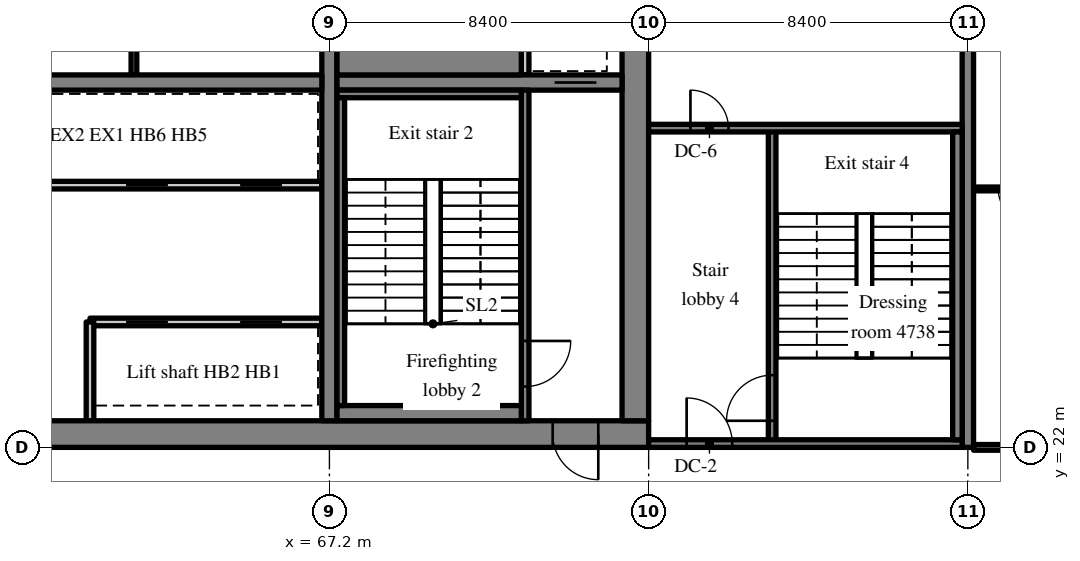
"""IFC4 building model, lengths in metres.
Left out: names, types, materials, properties, quantities, classifications, styles, units other than length and angle.
Written with IfcOpenShell. Run it as: python <this file> out.ifc"""

import sys

from ifc_helpers import new_model, si_unit, direction, frame, frame_2d, origin, place, context, subcontext, project, spatial, rectangle, extrude, source, transform, mapped, element, fill, save


model = new_model("IFC4")
c1 = context("Model", 3, precision=1e-05, world=origin(), true_north=direction((0.0, 1.0)))
c2 = subcontext(c1, "Body", "Model", "MODEL_VIEW")
j1 = project(units=[si_unit("LENGTHUNIT", "METRE"), si_unit("PLANEANGLEUNIT", "RADIAN")], contexts=[c1])
p1 = place(None, origin())
s1 = spatial("IfcSite", under=j1, at=p1, CompositionType="ELEMENT")
p2 = place(p1, origin())
s2 = spatial("IfcBuilding", under=s1, at=p2, CompositionType="ELEMENT")
p3 = place(p2, frame((0.0, 0.0, 193.4)))
s3 = spatial("IfcBuildingStorey", under=s2, at=p3, CompositionType="ELEMENT", Elevation=193.4)
m1 = source(origin(), c2, "Body", "SweptSolid", [
    extrude(rectangle(XDim=50.4, YDim=0.7, at=frame_2d((25.2, 0.0))), origin(), (0.0, 0.0, 1.0), 3.52),
])
p4 = place(p3, frame((25.2, 22.35, 0.0), z_axis=(0.0, 0.0, 1.0), x_axis=(1.0, 0.0, 0.0)))
e1 = element("IfcWall", 1, at=p4, inside=s3, PredefinedType="SHEAR", context=c2, shape_type="MappedRepresentation", body=[
    mapped(m1, transform((0.0, 0.0, 0.0), scale=1.0)),
])
m2 = source(origin(), c2, "Body", "SweptSolid", [
    extrude(rectangle(XDim=1.8, YDim=2.1, at=frame_2d((0.9, 1.05))), frame((0.0, 0.36, 0.0), z_axis=(0.0, -1.0, 0.0), x_axis=(1.0, 0.0, 0.0)), (0.0, 0.0, 1.0), 0.72),
])
p5 = place(p4, frame((15.9, 0.0, 0.0)))
e2 = element("IfcOpeningElement", 2, at=p5, cuts=e1, PredefinedType="OPENING", context=c2, shape_type="MappedRepresentation", body=[
    mapped(m2, transform((0.0, 0.0, 0.0), scale=1.0)),
])
m3 = source(origin(), c2, "Body", "SweptSolid", [
    extrude(rectangle(XDim=0.9, YDim=2.1, at=frame_2d((0.45, 1.05))), frame((0.0, 0.36, 0.0), z_axis=(0.0, -1.0, 0.0), x_axis=(1.0, 0.0, 0.0)), (0.0, 0.0, 1.0), 0.72),
])
p6 = place(p4, frame((9.7, 0.0, 0.0)))
e3 = element("IfcOpeningElement", 3, at=p6, cuts=e1, PredefinedType="OPENING", context=c2, shape_type="MappedRepresentation", body=[
    mapped(m3, transform((0.0, 0.0, 0.0), scale=1.0)),
])
p7 = place(p4, frame((21.5, 0.0, 0.0)))
e4 = element("IfcOpeningElement", 4, at=p7, cuts=e1, PredefinedType="OPENING", context=c2, shape_type="MappedRepresentation", body=[
    mapped(m3, transform((0.0, 0.0, 0.0), scale=1.0)),
])
p8 = place(p4, frame((32.7, 0.0, 0.0)))
e5 = element("IfcOpeningElement", 5, at=p8, cuts=e1, PredefinedType="OPENING", context=c2, shape_type="MappedRepresentation", body=[
    mapped(m2, transform((0.0, 0.0, 0.0), scale=1.0)),
])
m4 = source(origin(), c2, "Body", "SweptSolid", [
    extrude(rectangle(XDim=1.2, YDim=2.1, at=frame_2d((0.6, 1.05))), frame((0.0, 0.36, 0.0), z_axis=(0.0, -1.0, 0.0), x_axis=(1.0, 0.0, 0.0)), (0.0, 0.0, 1.0), 0.72),
])
p9 = place(p4, frame((6.475, 0.0, 0.0)))
e6 = element("IfcOpeningElement", 6, at=p9, cuts=e1, PredefinedType="OPENING", context=c2, shape_type="MappedRepresentation", body=[
    mapped(m4, transform((0.0, 0.0, 0.0), scale=1.0)),
])
p10 = place(p4, frame((47.875, 0.0, 0.0)))
e7 = element("IfcOpeningElement", 7, at=p10, cuts=e1, PredefinedType="OPENING", context=c2, shape_type="MappedRepresentation", body=[
    mapped(m4, transform((0.0, 0.0, 0.0), scale=1.0)),
])
m5 = source(origin(), c2, "Body", "SweptSolid", [
    extrude(rectangle(XDim=18.6, YDim=0.7, at=frame_2d((9.3, 0.0))), origin(), (0.0, 0.0, 1.0), 3.52),
])
p11 = place(p3, frame((75.25, 22.7, 0.0), z_axis=(0.0, 0.0, 1.0), x_axis=(0.0, 1.0, 0.0)))
e8 = element("IfcWall", 8, at=p11, inside=s3, PredefinedType="SHEAR", context=c2, shape_type="MappedRepresentation", body=[
    mapped(m5, transform((0.0, 0.0, 0.0), scale=1.0)),
])
p12 = place(p11, frame((12.7, 0.0, 0.0)))
e9 = element("IfcOpeningElement", 9, at=p12, cuts=e8, PredefinedType="OPENING", context=c2, shape_type="MappedRepresentation", body=[
    mapped(m4, transform((0.0, 0.0, 0.0), scale=1.0)),
])
m6 = source(origin(), c2, "Body", "SweptSolid", [
    extrude(rectangle(XDim=18.6, YDim=0.4, at=frame_2d((9.3, 0.0))), origin(), (0.0, 0.0, 1.0), 3.52),
])
p13 = place(p3, frame((67.2, 22.7, 0.0), z_axis=(0.0, 0.0, 1.0), x_axis=(0.0, 1.0, 0.0)))
e10 = element("IfcWall", 10, at=p13, inside=s3, PredefinedType="SHEAR", context=c2, shape_type="MappedRepresentation", body=[
    mapped(m6, transform((0.0, 0.0, 0.0), scale=1.0)),
])
m7 = source(origin(), c2, "Body", "SweptSolid", [
    extrude(rectangle(XDim=16.4, YDim=0.4, at=frame_2d((8.2, 0.0))), origin(), (0.0, 0.0, 1.0), 3.52),
])
p14 = place(p3, frame((50.6, 31.6, 0.0), z_axis=(0.0, 0.0, 1.0), x_axis=(1.0, 0.0, 0.0)))
e11 = element("IfcWall", 11, at=p14, inside=s3, PredefinedType="SHEAR", context=c2, shape_type="MappedRepresentation", body=[
    mapped(m7, transform((0.0, 0.0, 0.0), scale=1.0)),
])
m8 = source(origin(), c2, "Body", "SweptSolid", [
    extrude(rectangle(XDim=1.0, YDim=2.1, at=frame_2d((0.5, 1.05))), frame((0.0, 0.21, 0.0), z_axis=(0.0, -1.0, 0.0), x_axis=(1.0, 0.0, 0.0)), (0.0, 0.0, 1.0), 0.42),
])
p15 = place(p14, frame((0.6, 0.0, 0.0)))
e12 = element("IfcOpeningElement", 12, at=p15, cuts=e11, PredefinedType="OPENING", context=c2, shape_type="MappedRepresentation", body=[
    mapped(m8, transform((0.0, 0.0, 0.0), scale=1.0)),
])
m9 = source(origin(), c2, "Body", "SweptSolid", [
    extrude(rectangle(XDim=7.5, YDim=0.4, at=frame_2d((3.75, 0.0))), origin(), (0.0, 0.0, 1.0), 3.52),
])
p16 = place(p3, frame((67.4, 31.6, 0.0), z_axis=(0.0, 0.0, 1.0), x_axis=(1.0, 0.0, 0.0)))
e13 = element("IfcWall", 13, at=p16, inside=s3, PredefinedType="SHEAR", context=c2, shape_type="MappedRepresentation", body=[
    mapped(m9, transform((0.0, 0.0, 0.0), scale=1.0)),
])
m10 = source(origin(), c2, "Body", "SweptSolid", [
    extrude(rectangle(XDim=1.1, YDim=2.1, at=frame_2d((0.55, 1.05))), frame((0.0, 0.21, 0.0), z_axis=(0.0, -1.0, 0.0), x_axis=(1.0, 0.0, 0.0)), (0.0, 0.0, 1.0), 0.42),
])
p17 = place(p16, frame((5.725, 0.0, 0.0)))
e14 = element("IfcOpeningElement", 14, at=p17, cuts=e13, PredefinedType="OPENING", context=c2, shape_type="MappedRepresentation", body=[
    mapped(m10, transform((0.0, 0.0, 0.0), scale=1.0)),
])
m11 = source(origin(), c2, "Body", "SweptSolid", [
    extrude(rectangle(XDim=20.0, YDim=0.3, at=frame_2d((10.0, 0.0))), origin(), (0.0, 0.0, 1.0), 3.52),
])
p18 = place(p3, frame((84.0, 22.0, 0.0), z_axis=(0.0, 0.0, 1.0), x_axis=(0.0, 1.0, 0.0)))
e15 = element("IfcWall", 15, at=p18, inside=s3, PredefinedType="SHEAR", context=c2, shape_type="MappedRepresentation", body=[
    mapped(m11, transform((0.0, 0.0, 0.0), scale=1.0)),
])
m12 = source(origin(), c2, "Body", "SweptSolid", [
    extrude(rectangle(XDim=6.1, YDim=0.2, at=frame_2d((3.05, 0.0))), origin(), (0.0, 0.0, 1.0), 3.52),
])
p19 = place(p3, frame((67.0, 25.3, 0.0), z_axis=(0.0, 0.0, 1.0), x_axis=(-1.0, 0.0, 0.0)))
e16 = element("IfcWall", 16, at=p19, inside=s3, PredefinedType="SOLIDWALL", context=c2, shape_type="MappedRepresentation", body=[
    mapped(m12, transform((0.0, 0.0, 0.0), scale=1.0)),
])
m13 = source(origin(), c2, "Body", "SweptSolid", [
    extrude(rectangle(XDim=1.1, YDim=2.1, at=frame_2d((0.55, 1.05))), frame((0.0, 0.11, 0.0), z_axis=(0.0, -1.0, 0.0), x_axis=(1.0, 0.0, 0.0)), (0.0, 0.0, 1.0), 0.22),
])
p20 = place(p19, frame((1.05, 0.0, 0.0)))
e17 = element("IfcOpeningElement", 17, at=p20, cuts=e16, PredefinedType="OPENING", context=c2, shape_type="MappedRepresentation", body=[
    mapped(m13, transform((0.0, 0.0, 0.0), scale=1.0)),
])
p21 = place(p19, frame((4.05, 0.0, 0.0)))
e18 = element("IfcOpeningElement", 18, at=p21, cuts=e16, PredefinedType="OPENING", context=c2, shape_type="MappedRepresentation", body=[
    mapped(m13, transform((0.0, 0.0, 0.0), scale=1.0)),
])
m14 = source(origin(), c2, "Body", "SweptSolid", [
    extrude(rectangle(XDim=12.1, YDim=0.2, at=frame_2d((6.05, 0.0))), origin(), (0.0, 0.0, 1.0), 3.52),
])
p22 = place(p3, frame((67.0, 28.9, 0.0), z_axis=(0.0, 0.0, 1.0), x_axis=(-1.0, 0.0, 0.0)))
e19 = element("IfcWall", 19, at=p22, inside=s3, PredefinedType="SOLIDWALL", context=c2, shape_type="MappedRepresentation", body=[
    mapped(m14, transform((0.0, 0.0, 0.0), scale=1.0)),
])
p23 = place(p22, frame((1.05, 0.0, 0.0)))
e20 = element("IfcOpeningElement", 20, at=p23, cuts=e19, PredefinedType="OPENING", context=c2, shape_type="MappedRepresentation", body=[
    mapped(m13, transform((0.0, 0.0, 0.0), scale=1.0)),
])
p24 = place(p22, frame((4.05, 0.0, 0.0)))
e21 = element("IfcOpeningElement", 21, at=p24, cuts=e19, PredefinedType="OPENING", context=c2, shape_type="MappedRepresentation", body=[
    mapped(m13, transform((0.0, 0.0, 0.0), scale=1.0)),
])
m15 = source(origin(), c2, "Body", "SweptSolid", [
    extrude(rectangle(XDim=2.6, YDim=0.2, at=frame_2d((1.3, 0.0))), origin(), (0.0, 0.0, 1.0), 3.52),
])
p25 = place(p3, frame((60.9, 22.7, 0.0), z_axis=(0.0, 0.0, 1.0), x_axis=(0.0, 1.0, 0.0)))
e22 = element("IfcWall", 22, at=p25, inside=s3, PredefinedType="SOLIDWALL", context=c2, shape_type="MappedRepresentation", body=[
    mapped(m15, transform((0.0, 0.0, 0.0), scale=1.0)),
])
m16 = source(origin(), c2, "Body", "SweptSolid", [
    extrude(rectangle(XDim=3.2, YDim=0.15, at=frame_2d((1.6, 0.0))), origin(), (0.0, 0.0, 1.0), 3.52),
])
p26 = place(p3, frame((62.056, 31.8, 0.0), z_axis=(0.0, 0.0, 1.0), x_axis=(0.0, 1.0, 0.0)))
e23 = element("IfcWall", 23, at=p26, inside=s3, PredefinedType="PARTITIONING", context=c2, shape_type="MappedRepresentation", body=[
    mapped(m16, transform((0.0, 0.0, 0.0), scale=1.0)),
])
m17 = source(origin(), c2, "Body", "SweptSolid", [
    extrude(rectangle(XDim=8.7, YDim=0.2, at=frame_2d((4.35, 0.0))), origin(), (0.0, 0.0, 1.0), 3.52),
])
p27 = place(p3, frame((72.35, 22.7, 0.0), z_axis=(0.0, 0.0, 1.0), x_axis=(0.0, 1.0, 0.0)))
e24 = element("IfcWall", 24, at=p27, inside=s3, PredefinedType="SOLIDWALL", context=c2, shape_type="MappedRepresentation", body=[
    mapped(m17, transform((0.0, 0.0, 0.0), scale=1.0)),
])
m18 = source(origin(), c2, "Body", "SweptSolid", [
    extrude(rectangle(XDim=1.2, YDim=2.1, at=frame_2d((0.6, 1.05))), frame((0.0, 0.11, 0.0), z_axis=(0.0, -1.0, 0.0), x_axis=(1.0, 0.0, 0.0)), (0.0, 0.0, 1.0), 0.22),
])
p28 = place(p27, frame((0.9, 0.0, 0.0)))
e25 = element("IfcOpeningElement", 25, at=p28, cuts=e24, PredefinedType="OPENING", context=c2, shape_type="MappedRepresentation", body=[
    mapped(m18, transform((0.0, 0.0, 0.0), scale=1.0)),
])
m19 = source(origin(), c2, "Body", "SweptSolid", [
    extrude(rectangle(XDim=1.8, YDim=0.2, at=frame_2d((0.9, 0.0))), origin(), (0.0, 0.0, 1.0), 3.52),
])
p29 = place(p3, frame((72.35, 31.8, 0.0), z_axis=(0.0, 0.0, 1.0), x_axis=(0.0, 1.0, 0.0)))
e26 = element("IfcWall", 26, at=p29, inside=s3, PredefinedType="SOLIDWALL", context=c2, shape_type="MappedRepresentation", body=[
    mapped(m19, transform((0.0, 0.0, 0.0), scale=1.0)),
])
m20 = source(origin(), c2, "Body", "SweptSolid", [
    extrude(rectangle(XDim=8.3, YDim=0.2, at=frame_2d((4.15, 0.0))), origin(), (0.0, 0.0, 1.0), 3.52),
])
p30 = place(p3, frame((78.85, 22.1, 0.0), z_axis=(0.0, 0.0, 1.0), x_axis=(0.0, 1.0, 0.0)))
e27 = element("IfcWall", 27, at=p30, inside=s3, PredefinedType="SOLIDWALL", context=c2, shape_type="MappedRepresentation", body=[
    mapped(m20, transform((0.0, 0.0, 0.0), scale=1.0)),
])
p31 = place(p30, frame((0.6, 0.0, 0.0)))
e28 = element("IfcOpeningElement", 28, at=p31, cuts=e27, PredefinedType="OPENING", context=c2, shape_type="MappedRepresentation", body=[
    mapped(m18, transform((0.0, 0.0, 0.0), scale=1.0)),
])
m21 = source(origin(), c2, "Body", "SweptSolid", [
    extrude(rectangle(XDim=8.25, YDim=0.2, at=frame_2d((4.125, 0.0))), origin(), (0.0, 0.0, 1.0), 3.52),
])
p32 = place(p3, frame((83.85, 22.1, 0.0), z_axis=(0.0, 0.0, 1.0), x_axis=(-1.0, 0.0, 0.0)))
e29 = element("IfcWall", 29, at=p32, inside=s3, PredefinedType="SOLIDWALL", context=c2, shape_type="MappedRepresentation", body=[
    mapped(m21, transform((0.0, 0.0, 0.0), scale=1.0)),
])
p33 = place(p32, frame((6.05, 0.0, 0.0)))
e30 = element("IfcOpeningElement", 30, at=p33, cuts=e29, PredefinedType="OPENING", context=c2, shape_type="MappedRepresentation", body=[
    mapped(m18, transform((0.0, 0.0, 0.0), scale=1.0)),
])
p34 = place(p3, frame((83.85, 30.4, 0.0), z_axis=(0.0, 0.0, 1.0), x_axis=(-1.0, 0.0, 0.0)))
e31 = element("IfcWall", 31, at=p34, inside=s3, PredefinedType="SOLIDWALL", context=c2, shape_type="MappedRepresentation", body=[
    mapped(m21, transform((0.0, 0.0, 0.0), scale=1.0)),
])
m22 = source(origin(), c2, "Body", "SweptSolid", [
    extrude(rectangle(XDim=1.0, YDim=2.1, at=frame_2d((0.5, 1.05))), frame((0.0, 0.11, 0.0), z_axis=(0.0, -1.0, 0.0), x_axis=(1.0, 0.0, 0.0)), (0.0, 0.0, 1.0), 0.22),
])
p35 = place(p34, frame((6.15, 0.0, 0.0)))
e32 = element("IfcOpeningElement", 32, at=p35, cuts=e31, PredefinedType="OPENING", context=c2, shape_type="MappedRepresentation", body=[
    mapped(m22, transform((0.0, 0.0, 0.0), scale=1.0)),
])
m23 = source(origin(), c2, "Body", "SweptSolid", [
    extrude(rectangle(XDim=4.85, YDim=0.4, at=frame_2d((2.425, 0.0))), origin(), (0.0, 0.0, 1.0), 3.52),
])
p36 = place(p3, frame((67.4, 22.9, 0.0), z_axis=(0.0, 0.0, 1.0), x_axis=(1.0, 0.0, 0.0)))
e33 = element("IfcWall", 33, at=p36, inside=s3, PredefinedType="SOLIDWALL", context=c2, shape_type="MappedRepresentation", body=[
    mapped(m23, transform((0.0, 0.0, 0.0), scale=1.0)),
])
m24 = source(origin(), c2, "Body", "SweptSolid", [
    extrude(rectangle(XDim=4.85, YDim=0.2, at=frame_2d((2.425, 0.0))), origin(), (0.0, 0.0, 1.0), 3.52),
])
p37 = place(p3, frame((67.4, 31.3, 0.0), z_axis=(0.0, 0.0, 1.0), x_axis=(1.0, 0.0, 0.0)))
e34 = element("IfcWall", 34, at=p37, inside=s3, PredefinedType="SOLIDWALL", context=c2, shape_type="MappedRepresentation", body=[
    mapped(m24, transform((0.0, 0.0, 0.0), scale=1.0)),
])
m25 = source(origin(), c2, "Body", "SweptSolid", [
    extrude(rectangle(XDim=8.1, YDim=0.2, at=frame_2d((4.05, 0.0))), origin(), (0.0, 0.0, 1.0), 3.52),
])
p38 = place(p3, frame((67.5, 23.1, 0.0), z_axis=(0.0, 0.0, 1.0), x_axis=(0.0, 1.0, 0.0)))
e35 = element("IfcWall", 35, at=p38, inside=s3, PredefinedType="SOLIDWALL", context=c2, shape_type="MappedRepresentation", body=[
    mapped(m25, transform((0.0, 0.0, 0.0), scale=1.0)),
])
m26 = source(origin(), c2, "Body", "SweptSolid", [
    extrude(rectangle(XDim=4.85, YDim=1.0, at=frame_2d((2.425, 0.0))), origin(), (0.0, 0.0, 1.0), 3.52),
])
p39 = place(p3, frame((67.4, 32.3, 0.0), z_axis=(0.0, 0.0, 1.0), x_axis=(1.0, 0.0, 0.0)))
e36 = element("IfcWall", 36, at=p39, inside=s3, PredefinedType="SOLIDWALL", context=c2, shape_type="MappedRepresentation", body=[
    mapped(m26, transform((0.0, 0.0, 0.0), scale=1.0)),
])
m27 = source(origin(), c2, "Body", "SweptSolid", [
    extrude(rectangle(XDim=8.1, YDim=0.25, at=frame_2d((4.05, 0.0))), origin(), (0.0, 0.0, 1.0), 3.52),
])
p40 = place(p3, frame((83.725, 22.2, 0.0), z_axis=(0.0, 0.0, 1.0), x_axis=(0.0, 1.0, 0.0)))
e37 = element("IfcWall", 37, at=p40, inside=s3, PredefinedType="SOLIDWALL", context=c2, shape_type="MappedRepresentation", body=[
    mapped(m27, transform((0.0, 0.0, 0.0), scale=1.0)),
])
m28 = source(origin(), c2, "Body", "SweptSolid", [
    extrude(rectangle(XDim=2.2, YDim=0.1, at=frame_2d((1.1, 0.0))), origin(), (0.0, 0.0, 1.0), 3.52),
])
p41 = place(p3, frame((84.15, 28.8, 0.0), z_axis=(0.0, 0.0, 1.0), x_axis=(1.0, 0.0, 0.0)))
e38 = element("IfcWall", 38, at=p41, inside=s3, PredefinedType="PARTITIONING", context=c2, shape_type="MappedRepresentation", body=[
    mapped(m28, transform((0.0, 0.0, 0.0), scale=1.0)),
])
m29 = source(origin(), c2, "Body", "SweptSolid", [
    extrude(rectangle(XDim=0.9, YDim=2.1, at=frame_2d((0.45, 1.05))), frame((0.0, 0.06, 0.0), z_axis=(0.0, -1.0, 0.0), x_axis=(1.0, 0.0, 0.0)), (0.0, 0.0, 1.0), 0.12),
])
p42 = place(p41, frame((0.65, 0.0, 0.0)))
e39 = element("IfcOpeningElement", 39, at=p42, cuts=e38, PredefinedType="OPENING", context=c2, shape_type="MappedRepresentation", body=[
    mapped(m29, transform((0.0, 0.0, 0.0), scale=1.0)),
])
m30 = source(origin(), c2, "Body", "SweptSolid", [
    extrude(rectangle(XDim=7.95, YDim=0.15, at=frame_2d((3.975, 0.0))), origin(), (0.0, 0.0, 1.0), 2.82),
])
p43 = place(p3, frame((84.15, 22.0, 0.0), z_axis=(0.0, 0.0, 1.0), x_axis=(1.0, 0.0, 0.0)))
e40 = element("IfcWall", 40, at=p43, inside=s3, PredefinedType="PARTITIONING", context=c2, shape_type="MappedRepresentation", body=[
    mapped(m30, transform((0.0, 0.0, 0.0), scale=1.0)),
])
m31 = source(origin(), c2, "Body", "SweptSolid", [
    extrude(rectangle(XDim=1.0, YDim=2.1, at=frame_2d((0.5, 1.05))), frame((0.0, 0.085, 0.0), z_axis=(0.0, -1.0, 0.0), x_axis=(1.0, 0.0, 0.0)), (0.0, 0.0, 1.0), 0.17),
])
p44 = place(p43, frame((6.4, 0.0, 0.0)))
e41 = element("IfcOpeningElement", 41, at=p44, cuts=e40, PredefinedType="OPENING", context=c2, shape_type="MappedRepresentation", body=[
    mapped(m31, transform((0.0, 0.0, 0.0), scale=1.0)),
])
m32 = source(origin(), c2, "Body", "SweptSolid", [
    extrude(rectangle(XDim=1.1, YDim=2.1, at=frame_2d((0.55, 1.05))), frame((0.0, 0.025, 0.0), z_axis=(0.0, -1.0, 0.0), x_axis=(1.0, 0.0, 0.0)), (0.0, 0.0, 1.0), 0.05),
])
p45 = place(p20, origin())
e42 = element("IfcDoor", 42, at=p45, inside=s3, OperationType="SLIDING_TO_RIGHT", PredefinedType="DOOR", context=c2, shape_type="MappedRepresentation", body=[
    mapped(m32, transform((0.0, 0.0, 0.0), scale=1.0)),
])
fill(e17, e42)
p46 = place(p21, origin())
e43 = element("IfcDoor", 43, at=p46, inside=s3, OperationType="SLIDING_TO_LEFT", PredefinedType="DOOR", context=c2, shape_type="MappedRepresentation", body=[
    mapped(m32, transform((0.0, 0.0, 0.0), scale=1.0)),
])
fill(e18, e43)
p47 = place(p23, origin())
e44 = element("IfcDoor", 44, at=p47, inside=s3, OperationType="SLIDING_TO_RIGHT", PredefinedType="DOOR", context=c2, shape_type="MappedRepresentation", body=[
    mapped(m32, transform((0.0, 0.0, 0.0), scale=1.0)),
])
fill(e20, e44)
p48 = place(p24, origin())
e45 = element("IfcDoor", 45, at=p48, inside=s3, OperationType="SLIDING_TO_LEFT", PredefinedType="DOOR", context=c2, shape_type="MappedRepresentation", body=[
    mapped(m32, transform((0.0, 0.0, 0.0), scale=1.0)),
])
fill(e21, e45)
m33 = source(origin(), c2, "Body", "SweptSolid", [
    extrude(rectangle(XDim=1.2, YDim=2.1, at=frame_2d((0.6, 1.05))), frame((0.0, 0.025, 0.0), z_axis=(0.0, -1.0, 0.0), x_axis=(1.0, 0.0, 0.0)), (0.0, 0.0, 1.0), 0.05),
])
p49 = place(p28, origin())
e46 = element("IfcDoor", 46, at=p49, inside=s3, OperationType="SINGLE_SWING_RIGHT", PredefinedType="DOOR", context=c2, shape_type="MappedRepresentation", body=[
    mapped(m33, transform((0.0, 0.0, 0.0), scale=1.0)),
])
fill(e25, e46)
m34 = source(origin(), c2, "Body", "SweptSolid", [
    extrude(rectangle(XDim=1.2, YDim=2.1, at=frame_2d((0.6, 1.05))), frame((0.0, 0.275, 0.0), z_axis=(0.0, -1.0, 0.0), x_axis=(1.0, 0.0, 0.0)), (0.0, 0.0, 1.0), 0.05),
])
p50 = place(p10, origin())
e47 = element("IfcDoor", 47, at=p50, inside=s3, OperationType="SINGLE_SWING_RIGHT", PredefinedType="DOOR", context=c2, shape_type="MappedRepresentation", body=[
    mapped(m34, transform((0.0, 0.0, 0.0), scale=1.0)),
])
fill(e7, e47)
p51 = place(p17, origin())
e48 = element("IfcDoor", 48, at=p51, inside=s3, OperationType="SLIDING_TO_RIGHT", PredefinedType="DOOR", context=c2, shape_type="MappedRepresentation", body=[
    mapped(m32, transform((0.0, 0.0, 0.0), scale=1.0)),
])
fill(e14, e48)
p52 = place(p31, origin())
e49 = element("IfcDoor", 49, at=p52, inside=s3, OperationType="SINGLE_SWING_LEFT", PredefinedType="DOOR", context=c2, shape_type="MappedRepresentation", body=[
    mapped(m33, transform((0.0, 0.0, 0.0), scale=1.0)),
])
fill(e28, e49)
p53 = place(p33, origin())
e50 = element("IfcDoor", 50, at=p53, inside=s3, OperationType="SINGLE_SWING_RIGHT", PredefinedType="DOOR", context=c2, shape_type="MappedRepresentation", body=[
    mapped(m33, transform((0.0, 0.0, 0.0), scale=1.0)),
])
fill(e30, e50)
m35 = source(origin(), c2, "Body", "SweptSolid", [
    extrude(rectangle(XDim=1.0, YDim=2.1, at=frame_2d((0.5, 1.05))), frame((0.0, 0.025, 0.0), z_axis=(0.0, -1.0, 0.0), x_axis=(1.0, 0.0, 0.0)), (0.0, 0.0, 1.0), 0.05),
])
p54 = place(p35, origin())
e51 = element("IfcDoor", 51, at=p54, inside=s3, OperationType="SINGLE_SWING_RIGHT", PredefinedType="DOOR", context=c2, shape_type="MappedRepresentation", body=[
    mapped(m35, transform((0.0, 0.0, 0.0), scale=1.0)),
])
fill(e32, e51)
m36 = source(origin(), c2, "Body", "SweptSolid", [
    extrude(rectangle(XDim=0.9, YDim=2.1, at=frame_2d((0.45, 1.05))), frame((0.0, 0.025, 0.0), z_axis=(0.0, -1.0, 0.0), x_axis=(1.0, 0.0, 0.0)), (0.0, 0.0, 1.0), 0.05),
])
p55 = place(p42, origin())
e52 = element("IfcDoor", 52, at=p55, inside=s3, OperationType="SINGLE_SWING_RIGHT", PredefinedType="DOOR", context=c2, shape_type="MappedRepresentation", body=[
    mapped(m36, transform((0.0, 0.0, 0.0), scale=1.0)),
])
fill(e39, e52)
save(model, sys.argv[1])
